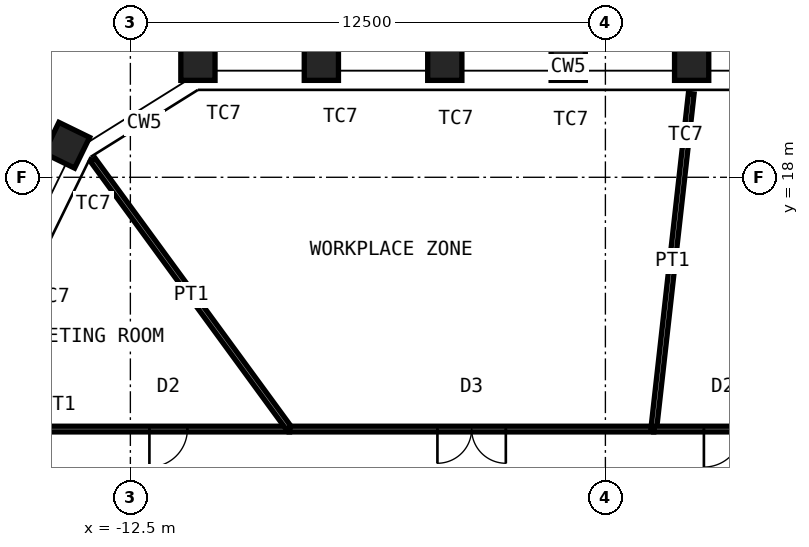
"""IFC4 building model, lengths in metres.
Left out: names, types, materials, properties, quantities, classifications, styles, units other than length and angle.
Written with IfcOpenShell. Run it as: python <this file> out.ifc"""

import sys

from ifc_helpers import new_model, si_unit, direction, frame, frame_2d, origin, origin_2d, place, context, subcontext, project, spatial, rectangle, hollow_rectangle, extrude, element, fill, save


model = new_model("IFC4")
c1 = context("Model", 3, precision=1e-05, world=origin(), true_north=direction((0.0, 1.0)))
c2 = subcontext(c1, "Body", "Model", "MODEL_VIEW")
j1 = project(units=[si_unit("LENGTHUNIT", "METRE"), si_unit("PLANEANGLEUNIT", "RADIAN")], contexts=[c1])
p1 = place(None, origin())
s1 = spatial("IfcSite", under=j1, at=p1, CompositionType="ELEMENT")
p2 = place(p1, origin())
s2 = spatial("IfcBuilding", under=s1, at=p2, CompositionType="ELEMENT")
p3 = place(p2, frame((0.0, 0.0, 287.2)))
s3 = spatial("IfcBuildingStorey", under=s2, at=p3, CompositionType="ELEMENT", Elevation=287.2)
for number, where, z_axis, x_axis in (
    (1, (-10.722, 21.0, 0.0), (0.0, 0.0, 1.0), (-1.0, 0.0, 0.0)),
    (2, (-7.474, 21.0, 0.0), (0.0, 0.0, 1.0), (-1.0, 0.0, 0.0)),
    (3, (-4.226, 21.0, 0.0), (0.0, 0.0, 1.0), (-1.0, 0.0, 0.0)),
    (4, (-0.978, 21.0, 0.0), (0.0, 0.0, 1.0), (-1.0, 0.0, 0.0)),
    (5, (2.27, 21.0, 0.0), (0.0, 0.0, 1.0), (-1.0, 0.0, 0.0)),
    (6, (-14.174, 18.843, 0.0), (0.0, 0.0, 1.0), (-0.438, -0.899, 0.0)),
):
    element("IfcColumn", number, at=place(p3, frame(where, z_axis=z_axis, x_axis=x_axis)), inside=s3, PredefinedType="COLUMN", context=c2, shape_type="SweptSolid", body=[
        extrude(hollow_rectangle(XDim=0.9, YDim=0.9, WallThickness=0.06, at=origin_2d()), origin(), (0.0, 0.0, 1.0), 4.2),
    ])
p4 = place(p3, frame((-14.686, 11.375, 0.0), z_axis=(0.0, 0.0, 1.0), x_axis=(1.0, 0.0, 0.0)))
e7 = element("IfcWall", 7, at=p4, inside=s3, PredefinedType="PARTITIONING", context=c2, shape_type="SweptSolid", body=[
    extrude(rectangle(XDim=6.373, YDim=0.15, at=frame_2d((3.187, 0.0))), origin(), (0.0, 0.0, 1.0), 4.03),
])
p5 = place(p4, frame((2.687, 0.0, 0.0)))
e8 = element("IfcOpeningElement", 8, at=p5, cuts=e7, PredefinedType="OPENING", context=c2, shape_type="SweptSolid", body=[
    extrude(rectangle(XDim=1.0, YDim=2.4, at=frame_2d((0.5, 1.2))), frame((0.0, 0.085, 0.0), z_axis=(0.0, -1.0, 0.0), x_axis=(1.0, 0.0, 0.0)), (0.0, 0.0, 1.0), 0.17),
])
p6 = place(p3, frame((-13.486, 18.455, 0.0), z_axis=(0.0, 0.0, 1.0), x_axis=(0.589997742419, -0.807404894672, 0.0)))
e9 = element("IfcWall", 9, at=p6, inside=s3, PredefinedType="PARTITIONING", context=c2, shape_type="SweptSolid", body=[
    extrude(rectangle(XDim=8.769, YDim=0.15, at=frame_2d((4.385, 0.0))), origin(), (0.0, 0.0, 1.0), 2.93),
])
p7 = place(p3, frame((-8.312, 11.375, 0.0), z_axis=(0.0, 0.0, 1.0), x_axis=(1.0, 0.0, 0.0)))
e10 = element("IfcWall", 10, at=p7, inside=s3, PredefinedType="PARTITIONING", context=c2, shape_type="SweptSolid", body=[
    extrude(rectangle(XDim=9.584, YDim=0.15, at=frame_2d((4.792, 0.0))), origin(), (0.0, 0.0, 1.0), 4.03),
])
p8 = place(p7, frame((3.892, 0.0, 0.0)))
e11 = element("IfcOpeningElement", 11, at=p8, cuts=e10, PredefinedType="OPENING", context=c2, shape_type="SweptSolid", body=[
    extrude(rectangle(XDim=1.8, YDim=2.4, at=frame_2d((0.9, 1.2))), frame((0.0, 0.085, 0.0), z_axis=(0.0, -1.0, 0.0), x_axis=(1.0, 0.0, 0.0)), (0.0, 0.0, 1.0), 0.17),
])
p9 = place(p3, frame((2.259, 20.201, 0.0), z_axis=(0.0, 0.0, 1.0), x_axis=(-0.11111945026, -0.993807057619, 0.0)))
e12 = element("IfcWall", 12, at=p9, inside=s3, PredefinedType="PARTITIONING", context=c2, shape_type="SweptSolid", body=[
    extrude(rectangle(XDim=8.881, YDim=0.15, at=frame_2d((4.44, 0.0))), origin(), (0.0, 0.0, 1.0), 3.33),
])
p10 = place(p3, frame((1.272, 11.375, 0.0), z_axis=(0.0, 0.0, 1.0), x_axis=(1.0, 0.0, 0.0)))
e13 = element("IfcWall", 13, at=p10, inside=s3, PredefinedType="PARTITIONING", context=c2, shape_type="SweptSolid", body=[
    extrude(rectangle(XDim=3.64, YDim=0.15, at=frame_2d((1.82, 0.0))), origin(), (0.0, 0.0, 1.0), 4.03),
])
p11 = place(p10, frame((1.32, 0.0, 0.0)))
e14 = element("IfcOpeningElement", 14, at=p11, cuts=e13, PredefinedType="OPENING", context=c2, shape_type="SweptSolid", body=[
    extrude(rectangle(XDim=1.0, YDim=2.4, at=frame_2d((0.5, 1.2))), frame((0.0, 0.085, 0.0), z_axis=(0.0, -1.0, 0.0), x_axis=(1.0, 0.0, 0.0)), (0.0, 0.0, 1.0), 0.17),
])
p12 = place(p5, origin())
e15 = element("IfcDoor", 15, at=p12, inside=s3, OperationType="SINGLE_SWING_LEFT", PredefinedType="DOOR", context=c2, shape_type="SweptSolid", body=[
    extrude(rectangle(XDim=1.0, YDim=2.4, at=frame_2d((0.5, 1.2))), frame((0.0, 0.025, 0.0), z_axis=(0.0, -1.0, 0.0), x_axis=(1.0, 0.0, 0.0)), (0.0, 0.0, 1.0), 0.05),
])
fill(e8, e15)
p13 = place(p8, origin())
e16 = element("IfcDoor", 16, at=p13, inside=s3, OperationType="DOUBLE_DOOR_DOUBLE_SWING", PredefinedType="DOOR", context=c2, shape_type="SweptSolid", body=[
    extrude(rectangle(XDim=1.8, YDim=2.4, at=frame_2d((0.9, 1.2))), frame((0.0, 0.025, 0.0), z_axis=(0.0, -1.0, 0.0), x_axis=(1.0, 0.0, 0.0)), (0.0, 0.0, 1.0), 0.05),
])
fill(e11, e16)
p14 = place(p11, origin())
e17 = element("IfcDoor", 17, at=p14, inside=s3, OperationType="SINGLE_SWING_LEFT", PredefinedType="DOOR", context=c2, shape_type="SweptSolid", body=[
    extrude(rectangle(XDim=1.0, YDim=2.4, at=frame_2d((0.5, 1.2))), frame((0.0, 0.025, 0.0), z_axis=(0.0, -1.0, 0.0), x_axis=(1.0, 0.0, 0.0)), (0.0, 0.0, 1.0), 0.05),
])
fill(e14, e17)
save(model, sys.argv[1])
